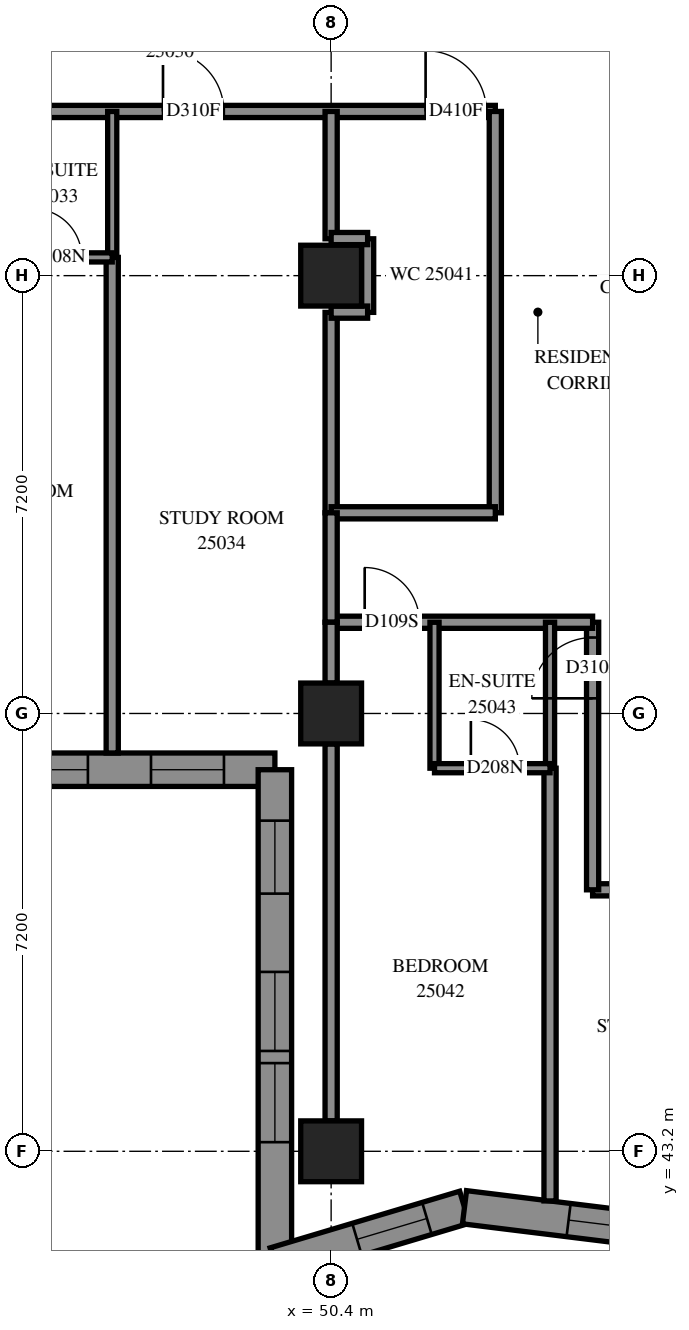
"""IFC4 building model, lengths in metres.
Left out: names, types, materials, properties, quantities, classifications, styles, units other than length and angle.
Written with IfcOpenShell. Run it as: python <this file> out.ifc"""

import sys

from ifc_helpers import new_model, si_unit, direction, frame, frame_2d, origin, origin_2d, place, context, subcontext, project, spatial, polyline, rectangle, outline, extrude, element, fill, save


model = new_model("IFC4")
c1 = context("Model", 3, precision=1e-05, world=origin(), true_north=direction((0.0, 1.0)))
c2 = subcontext(c1, "Body", "Model", "MODEL_VIEW")
j1 = project(units=[si_unit("LENGTHUNIT", "METRE"), si_unit("PLANEANGLEUNIT", "RADIAN")], contexts=[c1])
p1 = place(None, origin())
s1 = spatial("IfcSite", under=j1, at=p1, CompositionType="ELEMENT")
p2 = place(p1, origin())
s2 = spatial("IfcBuilding", under=s1, at=p2, CompositionType="ELEMENT")
p3 = place(p2, frame((0.0, 0.0, 94.8)))
s3 = spatial("IfcBuildingStorey", under=s2, at=p3, CompositionType="ELEMENT", Elevation=94.8)
for number, where, z_axis, x_axis in (
    (1, (50.4, 43.2, 0.0), (0.0, 0.0, 1.0), (1.0, 0.0, 0.0)),
    (2, (50.4, 50.4, 0.0), (0.0, 0.0, 1.0), (1.0, 0.0, 0.0)),
    (3, (50.4, 57.6, 0.0), (0.0, 0.0, 1.0), (1.0, 0.0, 0.0)),
):
    element("IfcColumn", number, at=place(p3, frame(where, z_axis=z_axis, x_axis=x_axis)), inside=s3, PredefinedType="COLUMN", context=c2, shape_type="SweptSolid", body=[
        extrude(rectangle(XDim=1.0, YDim=1.0, at=origin_2d()), origin(), (0.0, 0.0, 1.0), 3.1),
    ])
p4 = place(p3, frame((42.275, 49.475, 0.0), z_axis=(0.0, 0.0, 1.0), x_axis=(1.0, 0.0, 0.0)))
e4 = element("IfcWall", 4, at=p4, inside=s3, PredefinedType="SOLIDWALL", context=c2, shape_type="SweptSolid", body=[
    extrude(outline(polyline([(-0.275, -0.275), (6.925, -0.275), (7.475, 0.275), (0.275, 0.275), (-0.275, -0.275)])), origin(), (0.0, 0.0, 1.0), 3.1),
])
p5 = place(p4, frame((1.325, 0.0, 0.5)))
e5 = element("IfcOpeningElement", 5, at=p5, cuts=e4, PredefinedType="OPENING", context=c2, shape_type="SweptSolid", body=[
    extrude(rectangle(XDim=1.3, YDim=2.45, at=frame_2d((0.65, 1.225))), frame((0.0, 0.285, 0.0), z_axis=(0.0, -1.0, 0.0), x_axis=(1.0, 0.0, 0.0)), (0.0, 0.0, 1.0), 0.57),
])
p6 = place(p4, frame((2.825, 0.0, 0.5)))
e6 = element("IfcOpeningElement", 6, at=p6, cuts=e4, PredefinedType="OPENING", context=c2, shape_type="SweptSolid", body=[
    extrude(rectangle(XDim=1.3, YDim=2.45, at=frame_2d((0.65, 1.225))), frame((0.0, 0.285, 0.0), z_axis=(0.0, -1.0, 0.0), x_axis=(1.0, 0.0, 0.0)), (0.0, 0.0, 1.0), 0.57),
])
p7 = place(p4, frame((5.162, 0.0, 0.5)))
e7 = element("IfcOpeningElement", 7, at=p7, cuts=e4, PredefinedType="OPENING", context=c2, shape_type="SweptSolid", body=[
    extrude(rectangle(XDim=1.2, YDim=2.45, at=frame_2d((0.6, 1.225))), frame((0.0, 0.285, 0.0), z_axis=(0.0, -1.0, 0.0), x_axis=(1.0, 0.0, 0.0)), (0.0, 0.0, 1.0), 0.57),
])
p8 = place(p3, frame((49.475, 49.475, 0.0), z_axis=(0.0, 0.0, 1.0), x_axis=(0.0, -1.0, 0.0)))
e8 = element("IfcWall", 8, at=p8, inside=s3, PredefinedType="SOLIDWALL", context=c2, shape_type="SweptSolid", body=[
    extrude(outline(polyline([(0.275, -0.275), (8.496, -0.275), (7.758, 0.275), (-0.275, 0.275), (0.275, -0.275)])), origin(), (0.0, 0.0, 1.0), 3.1),
])
p9 = place(p8, frame((3.325, 0.0, 0.5)))
e9 = element("IfcOpeningElement", 9, at=p9, cuts=e8, PredefinedType="OPENING", context=c2, shape_type="SweptSolid", body=[
    extrude(rectangle(XDim=1.3, YDim=2.45, at=frame_2d((0.65, 1.225))), frame((0.0, 0.285, 0.0), z_axis=(0.0, -1.0, 0.0), x_axis=(1.0, 0.0, 0.0)), (0.0, 0.0, 1.0), 0.57),
])
p10 = place(p8, frame((4.825, 0.0, 0.5)))
e10 = element("IfcOpeningElement", 10, at=p10, cuts=e8, PredefinedType="OPENING", context=c2, shape_type="SweptSolid", body=[
    extrude(rectangle(XDim=1.3, YDim=2.45, at=frame_2d((0.65, 1.225))), frame((0.0, 0.285, 0.0), z_axis=(0.0, -1.0, 0.0), x_axis=(1.0, 0.0, 0.0)), (0.0, 0.0, 1.0), 0.57),
])
p11 = place(p8, frame((0.838, 0.0, 0.5)))
e11 = element("IfcOpeningElement", 11, at=p11, cuts=e8, PredefinedType="OPENING", context=c2, shape_type="SweptSolid", body=[
    extrude(rectangle(XDim=1.2, YDim=2.45, at=frame_2d((0.6, 1.225))), frame((0.0, 0.285, 0.0), z_axis=(0.0, -1.0, 0.0), x_axis=(1.0, 0.0, 0.0)), (0.0, 0.0, 1.0), 0.57),
])
p12 = place(p3, frame((49.475, 41.348, 0.0), z_axis=(0.0, 0.0, 1.0), x_axis=(0.9581327376, 0.2863243914, 0.0)))
e12 = element("IfcWall", 12, at=p12, inside=s3, PredefinedType="SOLIDWALL", context=c2, shape_type="SweptSolid", body=[
    extrude(outline(polyline([(-0.369, -0.275), (3.197, -0.275), (3.312, 0.275), (0.369, 0.275), (-0.369, -0.275)])), origin(), (0.0, 0.0, 1.0), 3.1),
])
p13 = place(p12, frame((1.41, 0.0, 0.5)))
e13 = element("IfcOpeningElement", 13, at=p13, cuts=e12, PredefinedType="OPENING", context=c2, shape_type="SweptSolid", body=[
    extrude(rectangle(XDim=1.2, YDim=2.45, at=frame_2d((0.6, 1.225))), frame((0.0, 0.285, 0.0), z_axis=(0.0, -1.0, 0.0), x_axis=(1.0, 0.0, 0.0)), (0.0, 0.0, 1.0), 0.57),
])
p14 = place(p3, frame((52.593, 42.28, 0.0), z_axis=(0.0, 0.0, 1.0), x_axis=(0.9924934036, -0.1222981756, 0.0)))
e14 = element("IfcWall", 14, at=p14, inside=s3, PredefinedType="SOLIDWALL", context=c2, shape_type="SweptSolid", body=[
    extrude(outline(polyline([(0.058, -0.275), (3.5, -0.275), (3.432, 0.275), (-0.058, 0.275), (0.058, -0.275)])), origin(), (0.0, 0.0, 1.0), 3.1),
])
p15 = place(p14, frame((1.725, 0.0, 0.5)))
e15 = element("IfcOpeningElement", 15, at=p15, cuts=e14, PredefinedType="OPENING", context=c2, shape_type="SweptSolid", body=[
    extrude(rectangle(XDim=1.2, YDim=2.45, at=frame_2d((0.6, 1.225))), frame((0.0, 0.285, 0.0), z_axis=(0.0, -1.0, 0.0), x_axis=(1.0, 0.0, 0.0)), (0.0, 0.0, 1.0), 0.57),
])
p16 = place(p3, frame((28.802, 60.3, 0.0), z_axis=(0.0, 0.0, 1.0), x_axis=(1.0, 0.0, 0.0)))
e16 = element("IfcWall", 16, at=p16, inside=s3, PredefinedType="PARTITIONING", context=c2, shape_type="SweptSolid", body=[
    extrude(rectangle(XDim=24.298, YDim=0.2, at=frame_2d((12.149, 0.0))), origin(), (0.0, 0.0, 1.0), 3.1),
])
p17 = place(p16, frame((5.972, 0.0, 0.0)))
e17 = element("IfcOpeningElement", 17, at=p17, cuts=e16, PredefinedType="OPENING", context=c2, shape_type="SweptSolid", body=[
    extrude(rectangle(XDim=1.0, YDim=2.1, at=frame_2d((0.5, 1.05))), frame((0.0, 0.11, 0.0), z_axis=(0.0, -1.0, 0.0), x_axis=(1.0, 0.0, 0.0)), (0.0, 0.0, 1.0), 0.22),
])
p18 = place(p16, frame((11.323, 0.0, 0.0)))
e18 = element("IfcOpeningElement", 18, at=p18, cuts=e16, PredefinedType="OPENING", context=c2, shape_type="SweptSolid", body=[
    extrude(rectangle(XDim=1.0, YDim=2.1, at=frame_2d((0.5, 1.05))), frame((0.0, 0.11, 0.0), z_axis=(0.0, -1.0, 0.0), x_axis=(1.0, 0.0, 0.0)), (0.0, 0.0, 1.0), 0.22),
])
p19 = place(p16, frame((14.798, 0.0, 0.0)))
e19 = element("IfcOpeningElement", 19, at=p19, cuts=e16, PredefinedType="OPENING", context=c2, shape_type="SweptSolid", body=[
    extrude(rectangle(XDim=0.9, YDim=2.1, at=frame_2d((0.45, 1.05))), frame((0.0, 0.11, 0.0), z_axis=(0.0, -1.0, 0.0), x_axis=(1.0, 0.0, 0.0)), (0.0, 0.0, 1.0), 0.22),
])
p20 = place(p16, frame((18.833, 0.0, 0.0)))
e20 = element("IfcOpeningElement", 20, at=p20, cuts=e16, PredefinedType="OPENING", context=c2, shape_type="SweptSolid", body=[
    extrude(rectangle(XDim=1.0, YDim=2.1, at=frame_2d((0.5, 1.05))), frame((0.0, 0.11, 0.0), z_axis=(0.0, -1.0, 0.0), x_axis=(1.0, 0.0, 0.0)), (0.0, 0.0, 1.0), 0.22),
])
p21 = place(p16, frame((23.151, 0.0, 0.0)))
e21 = element("IfcOpeningElement", 21, at=p21, cuts=e16, PredefinedType="OPENING", context=c2, shape_type="SweptSolid", body=[
    extrude(rectangle(XDim=1.0, YDim=2.1, at=frame_2d((0.5, 1.05))), frame((0.0, 0.11, 0.0), z_axis=(0.0, -1.0, 0.0), x_axis=(1.0, 0.0, 0.0)), (0.0, 0.0, 1.0), 0.22),
])
p22 = place(p3, frame((54.7, 47.5, 0.0), z_axis=(0.0, 0.0, 1.0), x_axis=(1.0, 0.0, 0.0)))
e22 = element("IfcWall", 22, at=p22, inside=s3, PredefinedType="PARTITIONING", context=c2, shape_type="SweptSolid", body=[
    extrude(rectangle(XDim=19.442, YDim=0.2, at=frame_2d((9.721, 0.0))), origin(), (0.0, 0.0, 1.0), 3.1),
])
p23 = place(p22, frame((5.2, 0.0, 0.0)))
e23 = element("IfcOpeningElement", 23, at=p23, cuts=e22, PredefinedType="OPENING", context=c2, shape_type="SweptSolid", body=[
    extrude(rectangle(XDim=0.9, YDim=2.1, at=frame_2d((0.45, 1.05))), frame((0.0, 0.11, 0.0), z_axis=(0.0, -1.0, 0.0), x_axis=(1.0, 0.0, 0.0)), (0.0, 0.0, 1.0), 0.22),
])
p24 = place(p22, frame((6.9, 0.0, 0.0)))
e24 = element("IfcOpeningElement", 24, at=p24, cuts=e22, PredefinedType="OPENING", context=c2, shape_type="SweptSolid", body=[
    extrude(rectangle(XDim=0.9, YDim=2.1, at=frame_2d((0.45, 1.05))), frame((0.0, 0.11, 0.0), z_axis=(0.0, -1.0, 0.0), x_axis=(1.0, 0.0, 0.0)), (0.0, 0.0, 1.0), 0.22),
])
p25 = place(p22, frame((13.963, 0.0, 0.0)))
e25 = element("IfcOpeningElement", 25, at=p25, cuts=e22, PredefinedType="OPENING", context=c2, shape_type="SweptSolid", body=[
    extrude(rectangle(XDim=1.0, YDim=2.1, at=frame_2d((0.5, 1.05))), frame((0.0, 0.11, 0.0), z_axis=(0.0, -1.0, 0.0), x_axis=(1.0, 0.0, 0.0)), (0.0, 0.0, 1.0), 0.22),
])
p26 = place(p3, frame((46.8, 49.75, 0.0), z_axis=(0.0, 0.0, 1.0), x_axis=(0.0, 1.0, 0.0)))
e26 = element("IfcWall", 26, at=p26, inside=s3, PredefinedType="PARTITIONING", context=c2, shape_type="SweptSolid", body=[
    extrude(rectangle(XDim=8.15, YDim=0.2, at=frame_2d((4.075, 0.0))), origin(), (0.0, 0.0, 1.0), 3.1),
])
p27 = place(p3, frame((54.0, 42.384, 0.0), z_axis=(0.0, 0.0, 1.0), x_axis=(0.0, 1.0, 0.0)))
e27 = element("IfcWall", 27, at=p27, inside=s3, PredefinedType="PARTITIONING", context=c2, shape_type="SweptSolid", body=[
    extrude(rectangle(XDim=7.116, YDim=0.2, at=frame_2d((3.558, 0.0))), origin(), (0.0, 0.0, 1.0), 3.1),
])
p28 = place(p3, frame((53.1, 53.7, 0.0), z_axis=(0.0, 0.0, 1.0), x_axis=(0.0, 1.0, 0.0)))
e28 = element("IfcWall", 28, at=p28, inside=s3, PredefinedType="PARTITIONING", context=c2, shape_type="SweptSolid", body=[
    extrude(rectangle(XDim=6.6, YDim=0.2, at=frame_2d((3.3, 0.0))), origin(), (0.0, 0.0, 1.0), 3.1),
])
p29 = place(p3, frame((50.4, 43.7, 0.0), z_axis=(0.0, 0.0, 1.0), x_axis=(0.0, 1.0, 0.0)))
e29 = element("IfcWall", 29, at=p29, inside=s3, PredefinedType="PARTITIONING", context=c2, shape_type="SweptSolid", body=[
    extrude(rectangle(XDim=6.2, YDim=0.2, at=frame_2d((3.1, 0.0))), origin(), (0.0, 0.0, 1.0), 2.6),
])
p30 = place(p3, frame((54.7, 47.5, 0.0), z_axis=(0.0, 0.0, 1.0), x_axis=(0.0, 1.0, 0.0)))
e30 = element("IfcWall", 30, at=p30, inside=s3, PredefinedType="PARTITIONING", context=c2, shape_type="SweptSolid", body=[
    extrude(rectangle(XDim=4.4, YDim=0.2, at=frame_2d((2.2, 0.0))), origin(), (0.0, 0.0, 1.0), 3.1),
])
p31 = place(p30, frame((3.149, 0.0, 0.0)))
e31 = element("IfcOpeningElement", 31, at=p31, cuts=e30, PredefinedType="OPENING", context=c2, shape_type="SweptSolid", body=[
    extrude(rectangle(XDim=1.0, YDim=2.1, at=frame_2d((0.5, 1.05))), frame((0.0, 0.11, 0.0), z_axis=(0.0, -1.0, 0.0), x_axis=(1.0, 0.0, 0.0)), (0.0, 0.0, 1.0), 0.22),
])
p32 = place(p3, frame((50.4, 51.9, 0.0), z_axis=(0.0, 0.0, 1.0), x_axis=(1.0, 0.0, 0.0)))
e32 = element("IfcWall", 32, at=p32, inside=s3, PredefinedType="PARTITIONING", context=c2, shape_type="SweptSolid", body=[
    extrude(rectangle(XDim=4.3, YDim=0.2, at=frame_2d((2.15, 0.0))), origin(), (0.0, 0.0, 1.0), 3.1),
])
p33 = place(p32, frame((0.552, 0.0, 0.0)))
e33 = element("IfcOpeningElement", 33, at=p33, cuts=e32, PredefinedType="OPENING", context=c2, shape_type="SweptSolid", body=[
    extrude(rectangle(XDim=0.9, YDim=2.1, at=frame_2d((0.45, 1.05))), frame((0.0, 0.11, 0.0), z_axis=(0.0, -1.0, 0.0), x_axis=(1.0, 0.0, 0.0)), (0.0, 0.0, 1.0), 0.22),
])
p34 = place(p3, frame((50.4, 53.7, 0.0), z_axis=(0.0, 0.0, 1.0), x_axis=(0.0, 1.0, 0.0)))
e34 = element("IfcWall", 34, at=p34, inside=s3, PredefinedType="PARTITIONING", context=c2, shape_type="SweptSolid", body=[
    extrude(rectangle(XDim=3.296, YDim=0.2, at=frame_2d((1.648, 0.0))), origin(), (0.0, 0.0, 1.0), 3.1),
])
p35 = place(p3, frame((50.4, 53.7, 0.0), z_axis=(0.0, 0.0, 1.0), x_axis=(1.0, 0.0, 0.0)))
e35 = element("IfcWall", 35, at=p35, inside=s3, PredefinedType="PARTITIONING", context=c2, shape_type="SweptSolid", body=[
    extrude(rectangle(XDim=2.7, YDim=0.2, at=frame_2d((1.35, 0.0))), origin(), (0.0, 0.0, 1.0), 3.1),
])
for number, where, z_axis, x_axis in (
    (36, (46.8, 57.9, 0.0), (0.0, 0.0, 1.0), (0.0, 1.0, 0.0)),
    (37, (52.1, 49.5, 0.0), (0.0, 0.0, 1.0), (0.0, 1.0, 0.0)),
    (38, (54.0, 49.5, 0.0), (0.0, 0.0, 1.0), (0.0, 1.0, 0.0)),
):
    element("IfcWall", number, at=place(p3, frame(where, z_axis=z_axis, x_axis=x_axis)), inside=s3, PredefinedType="PARTITIONING", context=c2, shape_type="SweptSolid", body=[
        extrude(rectangle(XDim=2.4, YDim=0.15, at=frame_2d((1.2, 0.0))), origin(), (0.0, 0.0, 1.0), 3.1),
    ])
p36 = place(p3, frame((50.4, 58.206, 0.0), z_axis=(0.0, 0.0, 1.0), x_axis=(0.0, 1.0, 0.0)))
e39 = element("IfcWall", 39, at=p36, inside=s3, PredefinedType="PARTITIONING", context=c2, shape_type="SweptSolid", body=[
    extrude(rectangle(XDim=2.094, YDim=0.2, at=frame_2d((1.047, 0.0))), origin(), (0.0, 0.0, 1.0), 3.1),
])
p37 = place(p3, frame((44.9, 57.9, 0.0), z_axis=(0.0, 0.0, 1.0), x_axis=(1.0, 0.0, 0.0)))
e40 = element("IfcWall", 40, at=p37, inside=s3, PredefinedType="PARTITIONING", context=c2, shape_type="SweptSolid", body=[
    extrude(rectangle(XDim=1.9, YDim=0.15, at=frame_2d((0.95, 0.0))), origin(), (0.0, 0.0, 1.0), 3.1),
])
p38 = place(p37, frame((0.598, 0.0, 0.0)))
e41 = element("IfcOpeningElement", 41, at=p38, cuts=e40, PredefinedType="OPENING", context=c2, shape_type="SweptSolid", body=[
    extrude(rectangle(XDim=0.8, YDim=2.1, at=frame_2d((0.4, 1.05))), frame((0.0, 0.085, 0.0), z_axis=(0.0, -1.0, 0.0), x_axis=(1.0, 0.0, 0.0)), (0.0, 0.0, 1.0), 0.17),
])
p39 = place(p3, frame((52.1, 49.5, 0.0), z_axis=(0.0, 0.0, 1.0), x_axis=(1.0, 0.0, 0.0)))
e42 = element("IfcWall", 42, at=p39, inside=s3, PredefinedType="PARTITIONING", context=c2, shape_type="SweptSolid", body=[
    extrude(rectangle(XDim=1.9, YDim=0.15, at=frame_2d((0.95, 0.0))), origin(), (0.0, 0.0, 1.0), 3.1),
])
p40 = place(p39, frame((0.598, 0.0, 0.0)))
e43 = element("IfcOpeningElement", 43, at=p40, cuts=e42, PredefinedType="OPENING", context=c2, shape_type="SweptSolid", body=[
    extrude(rectangle(XDim=0.8, YDim=2.1, at=frame_2d((0.4, 1.05))), frame((0.0, 0.085, 0.0), z_axis=(0.0, -1.0, 0.0), x_axis=(1.0, 0.0, 0.0)), (0.0, 0.0, 1.0), 0.17),
])
p41 = place(p3, frame((50.4, 51.9, 0.0), z_axis=(0.0, 0.0, 1.0), x_axis=(0.0, 1.0, 0.0)))
e44 = element("IfcWall", 44, at=p41, inside=s3, PredefinedType="PARTITIONING", context=c2, shape_type="SweptSolid", body=[
    extrude(rectangle(XDim=1.8, YDim=0.2, at=frame_2d((0.9, 0.0))), origin(), (0.0, 0.0, 1.0), 3.1),
])
p42 = place(p3, frame((51.0, 56.996, 0.0), z_axis=(0.0, 0.0, 1.0), x_axis=(0.0, 1.0, 0.0)))
e45 = element("IfcWall", 45, at=p42, inside=s3, PredefinedType="PARTITIONING", context=c2, shape_type="SweptSolid", body=[
    extrude(rectangle(XDim=1.21, YDim=0.2, at=frame_2d((0.605, 0.0))), origin(), (0.0, 0.0, 1.0), 3.1),
])
p43 = place(p3, frame((50.4, 50.9, 0.0), z_axis=(0.0, 0.0, 1.0), x_axis=(0.0, 1.0, 0.0)))
e46 = element("IfcWall", 46, at=p43, inside=s3, PredefinedType="PARTITIONING", context=c2, shape_type="SweptSolid", body=[
    extrude(rectangle(XDim=1.0, YDim=0.2, at=frame_2d((0.5, 0.0))), origin(), (0.0, 0.0, 1.0), 3.1),
])
for number, where, z_axis, x_axis in (
    (47, (50.4, 58.21, 0.0), (0.0, 0.0, 1.0), (1.0, 0.0, 0.0)),
    (48, (50.4, 57.0, 0.0), (0.0, 0.0, 1.0), (1.0, 0.0, 0.0)),
):
    element("IfcWall", number, at=place(p3, frame(where, z_axis=z_axis, x_axis=x_axis)), inside=s3, PredefinedType="PARTITIONING", context=c2, shape_type="SweptSolid", body=[
        extrude(rectangle(XDim=0.6, YDim=0.2, at=frame_2d((0.3, 0.0))), origin(), (0.0, 0.0, 1.0), 3.1),
    ])
p44 = place(p6, origin())
e49 = element("IfcWindow", 49, at=p44, inside=s3, PartitioningType="SINGLE_PANEL", PredefinedType="WINDOW", context=c2, shape_type="SweptSolid", body=[
    extrude(rectangle(XDim=1.3, YDim=2.45, at=frame_2d((0.65, 1.225))), frame((0.0, 0.155, 0.0), z_axis=(0.0, -1.0, 0.0), x_axis=(1.0, 0.0, 0.0)), (0.0, 0.0, 1.0), 0.06),
])
fill(e6, e49)
p45 = place(p7, origin())
e50 = element("IfcWindow", 50, at=p45, inside=s3, PartitioningType="SINGLE_PANEL", PredefinedType="WINDOW", context=c2, shape_type="SweptSolid", body=[
    extrude(rectangle(XDim=1.2, YDim=2.45, at=frame_2d((0.6, 1.225))), frame((0.0, 0.155, 0.0), z_axis=(0.0, -1.0, 0.0), x_axis=(1.0, 0.0, 0.0)), (0.0, 0.0, 1.0), 0.06),
])
fill(e7, e50)
p46 = place(p9, origin())
e51 = element("IfcWindow", 51, at=p46, inside=s3, PartitioningType="SINGLE_PANEL", PredefinedType="WINDOW", context=c2, shape_type="SweptSolid", body=[
    extrude(rectangle(XDim=1.3, YDim=2.45, at=frame_2d((0.65, 1.225))), frame((0.0, 0.155, 0.0), z_axis=(0.0, -1.0, 0.0), x_axis=(1.0, 0.0, 0.0)), (0.0, 0.0, 1.0), 0.06),
])
fill(e9, e51)
p47 = place(p10, origin())
e52 = element("IfcWindow", 52, at=p47, inside=s3, PartitioningType="SINGLE_PANEL", PredefinedType="WINDOW", context=c2, shape_type="SweptSolid", body=[
    extrude(rectangle(XDim=1.3, YDim=2.45, at=frame_2d((0.65, 1.225))), frame((0.0, 0.155, 0.0), z_axis=(0.0, -1.0, 0.0), x_axis=(1.0, 0.0, 0.0)), (0.0, 0.0, 1.0), 0.06),
])
fill(e10, e52)
p48 = place(p11, origin())
e53 = element("IfcWindow", 53, at=p48, inside=s3, PartitioningType="SINGLE_PANEL", PredefinedType="WINDOW", context=c2, shape_type="SweptSolid", body=[
    extrude(rectangle(XDim=1.2, YDim=2.45, at=frame_2d((0.6, 1.225))), frame((0.0, 0.155, 0.0), z_axis=(0.0, -1.0, 0.0), x_axis=(1.0, 0.0, 0.0)), (0.0, 0.0, 1.0), 0.06),
])
fill(e11, e53)
p49 = place(p13, origin())
e54 = element("IfcWindow", 54, at=p49, inside=s3, PartitioningType="SINGLE_PANEL", PredefinedType="WINDOW", context=c2, shape_type="SweptSolid", body=[
    extrude(rectangle(XDim=1.2, YDim=2.45, at=frame_2d((0.6, 1.225))), frame((0.0, 0.155, 0.0), z_axis=(0.0, -1.0, 0.0), x_axis=(1.0, 0.0, 0.0)), (0.0, 0.0, 1.0), 0.06),
])
fill(e13, e54)
p50 = place(p15, origin())
e55 = element("IfcWindow", 55, at=p50, inside=s3, PartitioningType="SINGLE_PANEL", PredefinedType="WINDOW", context=c2, shape_type="SweptSolid", body=[
    extrude(rectangle(XDim=1.2, YDim=2.45, at=frame_2d((0.6, 1.225))), frame((0.0, 0.155, 0.0), z_axis=(0.0, -1.0, 0.0), x_axis=(1.0, 0.0, 0.0)), (0.0, 0.0, 1.0), 0.06),
])
fill(e15, e55)
p51 = place(p38, origin())
e56 = element("IfcDoor", 56, at=p51, inside=s3, OperationType="SINGLE_SWING_RIGHT", PredefinedType="DOOR", context=c2, shape_type="SweptSolid", body=[
    extrude(rectangle(XDim=0.8, YDim=2.1, at=frame_2d((0.4, 1.05))), frame((0.0, 0.025, 0.0), z_axis=(0.0, -1.0, 0.0), x_axis=(1.0, 0.0, 0.0)), (0.0, 0.0, 1.0), 0.05),
])
fill(e41, e56)
p52 = place(p20, origin())
e57 = element("IfcDoor", 57, at=p52, inside=s3, OperationType="SINGLE_SWING_RIGHT", PredefinedType="DOOR", context=c2, shape_type="SweptSolid", body=[
    extrude(rectangle(XDim=1.0, YDim=2.1, at=frame_2d((0.5, 1.05))), frame((0.0, 0.025, 0.0), z_axis=(0.0, -1.0, 0.0), x_axis=(1.0, 0.0, 0.0)), (0.0, 0.0, 1.0), 0.05),
])
fill(e20, e57)
p53 = place(p21, origin())
e58 = element("IfcDoor", 58, at=p53, inside=s3, OperationType="SINGLE_SWING_LEFT", PredefinedType="DOOR", context=c2, shape_type="SweptSolid", body=[
    extrude(rectangle(XDim=1.0, YDim=2.1, at=frame_2d((0.5, 1.05))), frame((0.0, 0.025, 0.0), z_axis=(0.0, -1.0, 0.0), x_axis=(1.0, 0.0, 0.0)), (0.0, 0.0, 1.0), 0.05),
])
fill(e21, e58)
p54 = place(p33, origin())
e59 = element("IfcDoor", 59, at=p54, inside=s3, OperationType="SINGLE_SWING_LEFT", PredefinedType="DOOR", context=c2, shape_type="SweptSolid", body=[
    extrude(rectangle(XDim=0.9, YDim=2.1, at=frame_2d((0.45, 1.05))), frame((0.0, 0.025, 0.0), z_axis=(0.0, -1.0, 0.0), x_axis=(1.0, 0.0, 0.0)), (0.0, 0.0, 1.0), 0.05),
])
fill(e33, e59)
p55 = place(p40, origin())
e60 = element("IfcDoor", 60, at=p55, inside=s3, OperationType="SINGLE_SWING_RIGHT", PredefinedType="DOOR", context=c2, shape_type="SweptSolid", body=[
    extrude(rectangle(XDim=0.8, YDim=2.1, at=frame_2d((0.4, 1.05))), frame((0.0, 0.025, 0.0), z_axis=(0.0, -1.0, 0.0), x_axis=(1.0, 0.0, 0.0)), (0.0, 0.0, 1.0), 0.05),
])
fill(e43, e60)
p56 = place(p31, origin())
e61 = element("IfcDoor", 61, at=p56, inside=s3, OperationType="SINGLE_SWING_RIGHT", PredefinedType="DOOR", context=c2, shape_type="SweptSolid", body=[
    extrude(rectangle(XDim=1.0, YDim=2.1, at=frame_2d((0.5, 1.05))), frame((0.0, 0.025, 0.0), z_axis=(0.0, -1.0, 0.0), x_axis=(1.0, 0.0, 0.0)), (0.0, 0.0, 1.0), 0.05),
])
fill(e31, e61)
save(model, sys.argv[1])
